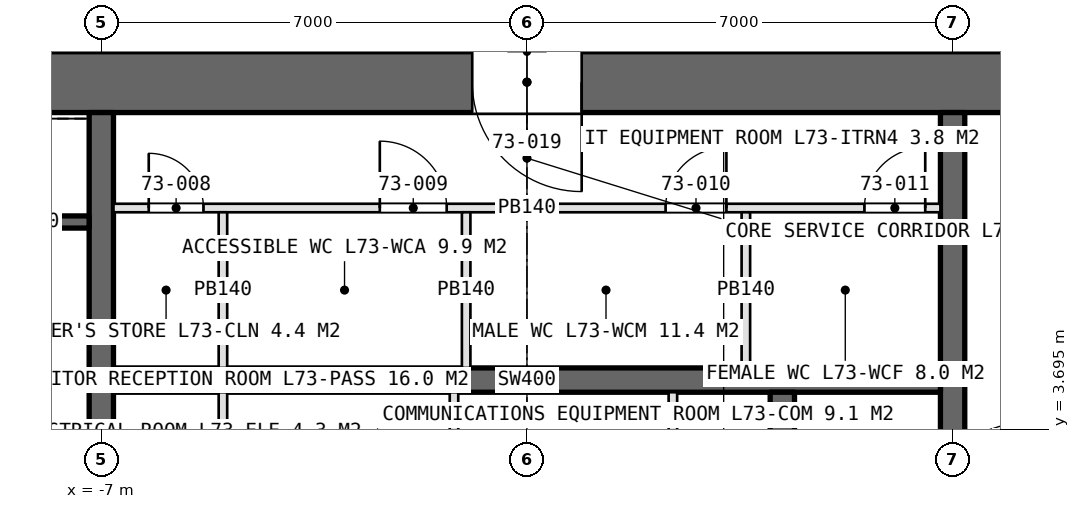
"""IFC4 building model, lengths in metres.
Left out: names, types, materials, properties, quantities, classifications, styles, units other than length and angle.
Written with IfcOpenShell. Run it as: python <this file> out.ifc"""

import sys

from ifc_helpers import new_model, si_unit, direction, frame, frame_2d, origin, place, context, subcontext, project, spatial, rectangle, extrude, element, fill, save


model = new_model("IFC4")
c1 = context("Model", 3, precision=1e-05, world=origin(), true_north=direction((0.0, 1.0)))
c2 = subcontext(c1, "Body", "Model", "MODEL_VIEW")
j1 = project(units=[si_unit("LENGTHUNIT", "METRE"), si_unit("PLANEANGLEUNIT", "RADIAN")], contexts=[c1])
p1 = place(None, origin())
s1 = spatial("IfcSite", under=j1, at=p1, CompositionType="ELEMENT")
p2 = place(p1, origin())
s2 = spatial("IfcBuilding", under=s1, at=p2, CompositionType="ELEMENT")
p3 = place(p2, frame((0.0, 0.0, 325.8)))
s3 = spatial("IfcBuildingStorey", under=s2, at=p3, CompositionType="ELEMENT", Elevation=325.8)
p4 = place(p3, frame((13.9, 9.4, 0.0), z_axis=(0.0, 0.0, 1.0), x_axis=(-1.0, 0.0, 0.0)))
e1 = element("IfcWall", 1, at=p4, inside=s3, PredefinedType="SHEAR", context=c2, shape_type="SweptSolid", body=[
    extrude(rectangle(XDim=27.8, YDim=1.0, at=frame_2d((13.9, 0.0))), origin(), (0.0, 0.0, 1.0), 4.2),
])
p5 = place(p4, frame((23.9, 0.0, 0.0)))
e2 = element("IfcOpeningElement", 2, at=p5, cuts=e1, PredefinedType="OPENING", context=c2, shape_type="SweptSolid", body=[
    extrude(rectangle(XDim=1.0, YDim=2.4, at=frame_2d((0.5, 1.2))), frame((0.0, 0.51, 0.0), z_axis=(0.0, -1.0, 0.0), x_axis=(1.0, 0.0, 0.0)), (0.0, 0.0, 1.0), 1.02),
])
p6 = place(p4, frame((13.0, 0.0, 0.0)))
e3 = element("IfcOpeningElement", 3, at=p6, cuts=e1, PredefinedType="OPENING", context=c2, shape_type="SweptSolid", body=[
    extrude(rectangle(XDim=1.8, YDim=2.4, at=frame_2d((0.9, 1.2))), frame((0.0, 0.51, 0.0), z_axis=(0.0, -1.0, 0.0), x_axis=(1.0, 0.0, 0.0)), (0.0, 0.0, 1.0), 1.02),
])
p7 = place(p3, frame((-7.0, -8.9, 0.0), z_axis=(0.0, 0.0, 1.0), x_axis=(0.0, 1.0, 0.0)))
e4 = element("IfcWall", 4, at=p7, inside=s3, PredefinedType="SHEAR", context=c2, shape_type="SweptSolid", body=[
    extrude(rectangle(XDim=17.8, YDim=0.4, at=frame_2d((8.9, 0.0))), origin(), (0.0, 0.0, 1.0), 4.2),
])
p8 = place(p7, frame((8.0, 0.0, 0.0)))
e5 = element("IfcOpeningElement", 5, at=p8, cuts=e4, PredefinedType="OPENING", context=c2, shape_type="SweptSolid", body=[
    extrude(rectangle(XDim=1.8, YDim=2.4, at=frame_2d((0.9, 1.2))), frame((0.0, 0.21, 0.0), z_axis=(0.0, -1.0, 0.0), x_axis=(1.0, 0.0, 0.0)), (0.0, 0.0, 1.0), 0.42),
])
p9 = place(p3, frame((7.0, -8.9, 0.0), z_axis=(0.0, 0.0, 1.0), x_axis=(0.0, 1.0, 0.0)))
e6 = element("IfcWall", 6, at=p9, inside=s3, PredefinedType="SHEAR", context=c2, shape_type="SweptSolid", body=[
    extrude(rectangle(XDim=17.8, YDim=0.4, at=frame_2d((8.9, 0.0))), origin(), (0.0, 0.0, 1.0), 4.2),
])
p10 = place(p9, frame((8.0, 0.0, 0.0)))
e7 = element("IfcOpeningElement", 7, at=p10, cuts=e6, PredefinedType="OPENING", context=c2, shape_type="SweptSolid", body=[
    extrude(rectangle(XDim=1.8, YDim=2.4, at=frame_2d((0.9, 1.2))), frame((0.0, 0.21, 0.0), z_axis=(0.0, -1.0, 0.0), x_axis=(1.0, 0.0, 0.0)), (0.0, 0.0, 1.0), 0.42),
])
p11 = place(p3, frame((-6.8, 4.5, 0.0), z_axis=(0.0, 0.0, 1.0), x_axis=(1.0, 0.0, 0.0)))
e8 = element("IfcWall", 8, at=p11, inside=s3, PredefinedType="SHEAR", context=c2, shape_type="SweptSolid", body=[
    extrude(rectangle(XDim=13.6, YDim=0.4, at=frame_2d((6.8, 0.0))), origin(), (0.0, 0.0, 1.0), 4.2),
])
p12 = place(p3, frame((4.2, 1.8, 0.0), z_axis=(0.0, 0.0, 1.0), x_axis=(0.0, 1.0, 0.0)))
e9 = element("IfcWall", 9, at=p12, inside=s3, PredefinedType="SHEAR", context=c2, shape_type="SweptSolid", body=[
    extrude(rectangle(XDim=2.5, YDim=0.4, at=frame_2d((1.25, 0.0))), origin(), (0.0, 0.0, 1.0), 4.2),
])
p13 = place(p3, frame((-6.8, 7.33, 0.0), z_axis=(0.0, 0.0, 1.0), x_axis=(1.0, 0.0, 0.0)))
e10 = element("IfcWall", 10, at=p13, inside=s3, PredefinedType="PARTITIONING", context=c2, shape_type="SweptSolid", body=[
    extrude(rectangle(XDim=13.6, YDim=0.14, at=frame_2d((6.8, 0.0))), origin(), (0.0, 0.0, 1.0), 3.95),
])
p14 = place(p13, frame((0.58, 0.0, 0.0)))
e11 = element("IfcOpeningElement", 11, at=p14, cuts=e10, PredefinedType="OPENING", context=c2, shape_type="SweptSolid", body=[
    extrude(rectangle(XDim=0.9, YDim=2.4, at=frame_2d((0.45, 1.2))), frame((0.0, 0.08, 0.0), z_axis=(0.0, -1.0, 0.0), x_axis=(1.0, 0.0, 0.0)), (0.0, 0.0, 1.0), 0.16),
])
p15 = place(p13, frame((4.38, 0.0, 0.0)))
e12 = element("IfcOpeningElement", 12, at=p15, cuts=e10, PredefinedType="OPENING", context=c2, shape_type="SweptSolid", body=[
    extrude(rectangle(XDim=1.1, YDim=2.4, at=frame_2d((0.55, 1.2))), frame((0.0, 0.08, 0.0), z_axis=(0.0, -1.0, 0.0), x_axis=(1.0, 0.0, 0.0)), (0.0, 0.0, 1.0), 0.16),
])
p16 = place(p13, frame((9.08, 0.0, 0.0)))
e13 = element("IfcOpeningElement", 13, at=p16, cuts=e10, PredefinedType="OPENING", context=c2, shape_type="SweptSolid", body=[
    extrude(rectangle(XDim=1.0, YDim=2.4, at=frame_2d((0.5, 1.2))), frame((0.0, 0.08, 0.0), z_axis=(0.0, -1.0, 0.0), x_axis=(1.0, 0.0, 0.0)), (0.0, 0.0, 1.0), 0.16),
])
p17 = place(p13, frame((12.35, 0.0, 0.0)))
e14 = element("IfcOpeningElement", 14, at=p17, cuts=e10, PredefinedType="OPENING", context=c2, shape_type="SweptSolid", body=[
    extrude(rectangle(XDim=1.0, YDim=2.4, at=frame_2d((0.5, 1.2))), frame((0.0, 0.08, 0.0), z_axis=(0.0, -1.0, 0.0), x_axis=(1.0, 0.0, 0.0)), (0.0, 0.0, 1.0), 0.16),
])
for number, where, z_axis, x_axis in (
    (15, (-5.0, 4.7, 0.0), (0.0, 0.0, 1.0), (0.0, 1.0, 0.0)),
    (16, (-1.0, 4.7, 0.0), (0.0, 0.0, 1.0), (0.0, 1.0, 0.0)),
    (17, (3.6, 4.7, 0.0), (0.0, 0.0, 1.0), (0.0, 1.0, 0.0)),
):
    element("IfcWall", number, at=place(p3, frame(where, z_axis=z_axis, x_axis=x_axis)), inside=s3, PredefinedType="PARTITIONING", context=c2, shape_type="SweptSolid", body=[
        extrude(rectangle(XDim=2.56, YDim=0.14, at=frame_2d((1.28, 0.0))), origin(), (0.0, 0.0, 1.0), 3.95),
    ])
for number, where, z_axis, x_axis in (
    (18, (-5.0, 1.8, 0.0), (0.0, 0.0, 1.0), (0.0, 1.0, 0.0)),
    (19, (-1.2, 1.8, 0.0), (0.0, 0.0, 1.0), (0.0, 1.0, 0.0)),
    (20, (2.4, 1.8, 0.0), (0.0, 0.0, 1.0), (0.0, 1.0, 0.0)),
):
    element("IfcWall", number, at=place(p3, frame(where, z_axis=z_axis, x_axis=x_axis)), inside=s3, PredefinedType="PARTITIONING", context=c2, shape_type="SweptSolid", body=[
        extrude(rectangle(XDim=2.5, YDim=0.14, at=frame_2d((1.25, 0.0))), origin(), (0.0, 0.0, 1.0), 3.95),
    ])
p18 = place(p3, frame((-9.15, 7.1, 0.0), z_axis=(0.0, 0.0, 1.0), x_axis=(1.0, 0.0, 0.0)))
e21 = element("IfcWall", 21, at=p18, inside=s3, PredefinedType="SOLIDWALL", context=c2, shape_type="SweptSolid", body=[
    extrude(rectangle(XDim=1.95, YDim=0.2, at=frame_2d((0.975, 0.0))), origin(), (0.0, 0.0, 1.0), 4.2),
])
p19 = place(p14, origin())
e22 = element("IfcDoor", 22, at=p19, inside=s3, OperationType="SINGLE_SWING_LEFT", PredefinedType="DOOR", context=c2, shape_type="SweptSolid", body=[
    extrude(rectangle(XDim=0.9, YDim=2.4, at=frame_2d((0.45, 1.2))), frame((0.0, 0.025, 0.0), z_axis=(0.0, -1.0, 0.0), x_axis=(1.0, 0.0, 0.0)), (0.0, 0.0, 1.0), 0.05),
])
fill(e11, e22)
p20 = place(p15, origin())
e23 = element("IfcDoor", 23, at=p20, inside=s3, OperationType="SINGLE_SWING_LEFT", PredefinedType="DOOR", context=c2, shape_type="SweptSolid", body=[
    extrude(rectangle(XDim=1.1, YDim=2.4, at=frame_2d((0.55, 1.2))), frame((0.0, 0.025, 0.0), z_axis=(0.0, -1.0, 0.0), x_axis=(1.0, 0.0, 0.0)), (0.0, 0.0, 1.0), 0.05),
])
fill(e12, e23)
p21 = place(p16, origin())
e24 = element("IfcDoor", 24, at=p21, inside=s3, OperationType="SINGLE_SWING_RIGHT", PredefinedType="DOOR", context=c2, shape_type="SweptSolid", body=[
    extrude(rectangle(XDim=1.0, YDim=2.4, at=frame_2d((0.5, 1.2))), frame((0.0, 0.025, 0.0), z_axis=(0.0, -1.0, 0.0), x_axis=(1.0, 0.0, 0.0)), (0.0, 0.0, 1.0), 0.05),
])
fill(e13, e24)
p22 = place(p17, origin())
e25 = element("IfcDoor", 25, at=p22, inside=s3, OperationType="SINGLE_SWING_RIGHT", PredefinedType="DOOR", context=c2, shape_type="SweptSolid", body=[
    extrude(rectangle(XDim=1.0, YDim=2.4, at=frame_2d((0.5, 1.2))), frame((0.0, 0.025, 0.0), z_axis=(0.0, -1.0, 0.0), x_axis=(1.0, 0.0, 0.0)), (0.0, 0.0, 1.0), 0.05),
])
fill(e14, e25)
p23 = place(p6, origin())
e26 = element("IfcDoor", 26, at=p23, inside=s3, OperationType="DOUBLE_DOOR_SINGLE_SWING", PredefinedType="DOOR", context=c2, shape_type="SweptSolid", body=[
    extrude(rectangle(XDim=1.8, YDim=2.4, at=frame_2d((0.9, 1.2))), frame((0.0, 0.025, 0.0), z_axis=(0.0, -1.0, 0.0), x_axis=(1.0, 0.0, 0.0)), (0.0, 0.0, 1.0), 0.05),
])
fill(e3, e26)
save(model, sys.argv[1])
